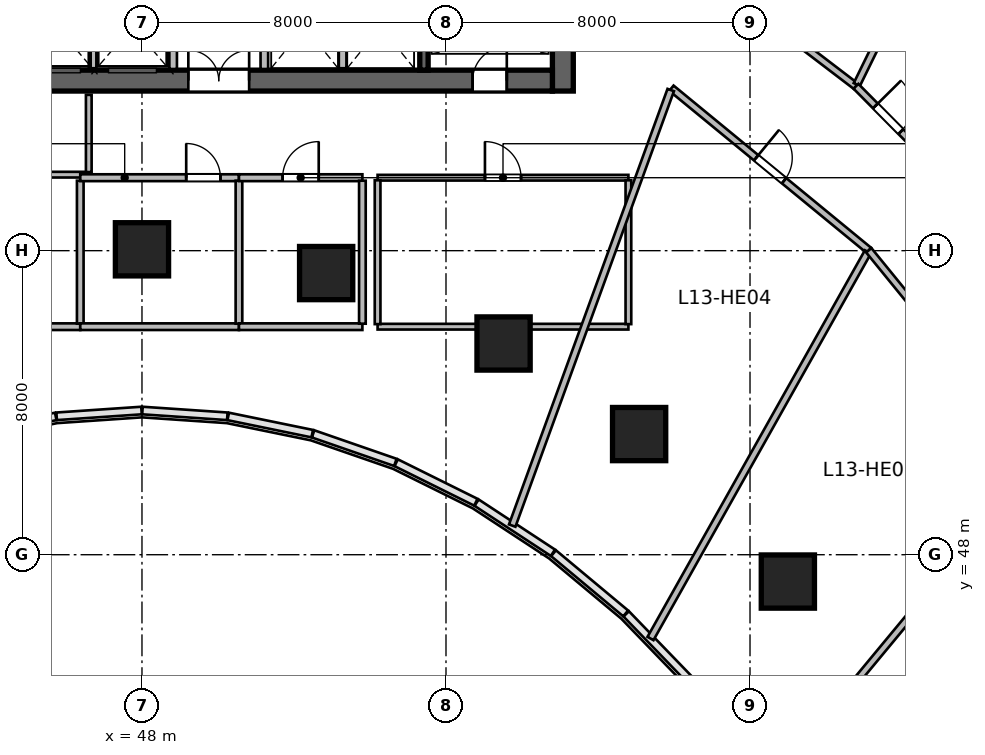
"""IFC4 building model, lengths in metres.
Left out: names, types, materials, properties, quantities, classifications, styles, units other than length and angle.
Written with IfcOpenShell. Run it as: python <this file> out.ifc"""

import sys

from ifc_helpers import new_model, si_unit, direction, frame, frame_2d, origin, origin_2d, place, context, subcontext, project, spatial, rectangle, circle, extrude, source, transform, mapped, element, fill, save


model = new_model("IFC4")
c1 = context("Model", 3, precision=1e-05, world=origin(), true_north=direction((0.0, 1.0)))
c2 = subcontext(c1, "Body", "Model", "MODEL_VIEW")
j1 = project(units=[si_unit("LENGTHUNIT", "METRE"), si_unit("PLANEANGLEUNIT", "RADIAN")], contexts=[c1])
p1 = place(None, origin())
s1 = spatial("IfcSite", under=j1, at=p1, CompositionType="ELEMENT")
p2 = place(p1, origin())
s2 = spatial("IfcBuilding", under=s1, at=p2, CompositionType="ELEMENT")
p3 = place(p2, frame((0.0, 0.0, 60.6)))
s3 = spatial("IfcBuildingStorey", under=s2, at=p3, CompositionType="ELEMENT", Elevation=60.6)
m1 = source(origin(), c2, "Body", "SweptSolid", [
    extrude(rectangle(XDim=12.0, YDim=0.55, at=frame_2d((6.0, 0.0))), origin(), (0.0, 0.0, 1.0), 3.6),
])
p4 = place(p3, frame((59.075, 60.2, 0.0), z_axis=(0.0, 0.0, 1.0), x_axis=(0.0, 1.0, 0.0)))
e1 = element("IfcWall", 1, at=p4, inside=s3, PredefinedType="SHEAR", context=c2, shape_type="MappedRepresentation", body=[
    mapped(m1, transform((0.0, 0.0, 0.0), scale=1.0)),
])
m2 = source(origin(), c2, "Body", "SweptSolid", [
    extrude(rectangle(XDim=21.6, YDim=0.55, at=frame_2d((10.8, 0.0))), origin(), (0.0, 0.0, 1.0), 3.6),
])
p5 = place(p3, frame((37.2, 60.475, 0.0), z_axis=(0.0, 0.0, 1.0), x_axis=(1.0, 0.0, 0.0)))
e2 = element("IfcWall", 2, at=p5, inside=s3, PredefinedType="SHEAR", context=c2, shape_type="MappedRepresentation", body=[
    mapped(m2, transform((0.0, 0.0, 0.0), scale=1.0)),
])
p6 = place(p5, frame((1.1, 0.0, 0.0)))
e3 = element("IfcOpeningElement", 3, at=p6, cuts=e2, PredefinedType="OPENING", context=c2, shape_type="SweptSolid", body=[
    extrude(rectangle(XDim=1.15, YDim=2.15, at=frame_2d((0.575, 1.075))), frame((0.0, 0.285, 0.0), z_axis=(0.0, -1.0, 0.0), x_axis=(1.0, 0.0, 0.0)), (0.0, 0.0, 1.0), 0.57),
])
p7 = place(p5, frame((19.5, 0.0, 0.0)))
e4 = element("IfcOpeningElement", 4, at=p7, cuts=e2, PredefinedType="OPENING", context=c2, shape_type="SweptSolid", body=[
    extrude(rectangle(XDim=0.9, YDim=2.1, at=frame_2d((0.45, 1.05))), frame((0.0, 0.285, 0.0), z_axis=(0.0, -1.0, 0.0), x_axis=(1.0, 0.0, 0.0)), (0.0, 0.0, 1.0), 0.57),
])
p8 = place(p5, frame((12.02, 0.0, 0.0)))
e5 = element("IfcOpeningElement", 5, at=p8, cuts=e2, PredefinedType="OPENING", context=c2, shape_type="SweptSolid", body=[
    extrude(rectangle(XDim=1.6, YDim=2.15, at=frame_2d((0.8, 1.075))), frame((0.0, 0.285, 0.0), z_axis=(0.0, -1.0, 0.0), x_axis=(1.0, 0.0, 0.0)), (0.0, 0.0, 1.0), 0.57),
])
m3 = source(origin(), c2, "Body", "SweptSolid", [
    extrude(rectangle(XDim=10.9, YDim=0.22, at=frame_2d((5.45, 0.0))), origin(), (0.0, 0.0, 1.0), 3.6),
])
p9 = place(p3, frame((55.42, 60.75, 0.0), z_axis=(0.0, 0.0, 1.0), x_axis=(0.0, 1.0, 0.0)))
e6 = element("IfcWall", 6, at=p9, inside=s3, PredefinedType="SHEAR", context=c2, shape_type="MappedRepresentation", body=[
    mapped(m3, transform((0.0, 0.0, 0.0), scale=1.0)),
])
p10 = place(p9, frame((9.495, 0.0, 0.0)))
e7 = element("IfcOpeningElement", 7, at=p10, cuts=e6, PredefinedType="OPENING", context=c2, shape_type="SweptSolid", body=[
    extrude(rectangle(XDim=1.15, YDim=2.15, at=frame_2d((0.575, 1.075))), frame((0.0, 0.12, 0.0), z_axis=(0.0, -1.0, 0.0), x_axis=(1.0, 0.0, 0.0)), (0.0, 0.0, 1.0), 0.24),
])
m4 = source(origin(), c2, "Body", "SweptSolid", [
    extrude(circle(Radius=0.7, at=origin_2d()), origin(), (0.0, 0.0, 1.0), 3.6),
])
for number, where, z_axis, x_axis in (
    (8, (48.0, 56.036, 0.0), (0.0, 0.0, 1.0), (0.0, 1.0, 0.0)),
    (9, (52.846, 55.411, 0.0), (0.0, 0.0, 1.0), (0.143, 0.99, 0.0)),
    (10, (57.515, 53.558, 0.0), (0.0, 0.0, 1.0), (0.289, 0.957, 0.0)),
    (11, (61.082, 51.175, 0.0), (0.0, 0.0, 1.0), (0.409, 0.912, 0.0)),
    (12, (64.996, 47.294, 0.0), (0.0, 0.0, 1.0), (0.558, 0.83, 0.0)),
):
    element("IfcColumn", number, at=place(p3, frame(where, z_axis=z_axis, x_axis=x_axis)), inside=s3, PredefinedType="COLUMN", context=c2, shape_type="MappedRepresentation", body=[
        mapped(m4, transform((0.0, 0.0, 0.0), scale=1.0)),
    ])
m5 = source(origin(), c2, "Body", "SweptSolid", [
    extrude(rectangle(XDim=2.24, YDim=0.2, at=frame_2d((1.12, 0.0))), origin(), (0.0, 0.0, 1.0), 3.36),
])
for number, where, z_axis, x_axis in (
    (13, (48.82, 60.78, 0.0), (0.0, 0.0, 1.0), (0.0, 1.0, 0.0)),
    (14, (51.22, 60.78, 0.0), (0.0, 0.0, 1.0), (0.0, 1.0, 0.0)),
):
    element("IfcWall", number, at=place(p3, frame(where, z_axis=z_axis, x_axis=x_axis)), inside=s3, PredefinedType="SOLIDWALL", context=c2, shape_type="MappedRepresentation", body=[
        mapped(m5, transform((0.0, 0.0, 0.0), scale=1.0)),
    ])
m6 = source(origin(), c2, "Body", "SweptSolid", [
    extrude(rectangle(XDim=2.2, YDim=0.2, at=frame_2d((1.1, 0.0))), origin(), (0.0, 0.0, 1.0), 3.36),
])
for number, where, z_axis, x_axis in (
    (15, (46.7, 60.8, 0.0), (0.0, 0.0, 1.0), (0.0, 1.0, 0.0)),
    (16, (53.28, 60.8, 0.0), (0.0, 0.0, 1.0), (0.0, 1.0, 0.0)),
):
    element("IfcWall", number, at=place(p3, frame(where, z_axis=z_axis, x_axis=x_axis)), inside=s3, PredefinedType="SOLIDWALL", context=c2, shape_type="MappedRepresentation", body=[
        mapped(m6, transform((0.0, 0.0, 0.0), scale=1.0)),
    ])
m7 = source(origin(), c2, "Body", "SweptSolid", [
    extrude(rectangle(XDim=5.4, YDim=0.15, at=frame_2d((2.7, 0.0))), origin(), (0.0, 0.0, 1.0), 3.36),
])
p11 = place(p3, frame((41.2, 58.0, 0.0), z_axis=(0.0, 0.0, 1.0), x_axis=(1.0, 0.0, 0.0)))
e17 = element("IfcWall", 17, at=p11, inside=s3, PredefinedType="PARTITIONING", context=c2, shape_type="MappedRepresentation", body=[
    mapped(m7, transform((0.0, 0.0, 0.0), scale=1.0)),
])
p12 = place(p11, frame((2.25, 0.0, 0.0)))
e18 = element("IfcOpeningElement", 18, at=p12, cuts=e17, PredefinedType="OPENING", context=c2, shape_type="SweptSolid", body=[
    extrude(rectangle(XDim=0.9, YDim=2.08, at=frame_2d((0.45, 1.04))), frame((0.0, 0.085, 0.0), z_axis=(0.0, -1.0, 0.0), x_axis=(1.0, 0.0, 0.0)), (0.0, 0.0, 1.0), 0.17),
])
m8 = source(origin(), c2, "Body", "SweptSolid", [
    extrude(rectangle(XDim=2.033, YDim=0.15, at=frame_2d((1.016, 0.0))), origin(), (0.0, 0.0, 1.0), 3.36),
])
p13 = place(p3, frame((46.6, 58.067, 0.0), z_axis=(0.0, 0.0, 1.0), x_axis=(0.0, 1.0, 0.0)))
e19 = element("IfcWall", 19, at=p13, inside=s3, PredefinedType="PARTITIONING", context=c2, shape_type="MappedRepresentation", body=[
    mapped(m8, transform((0.0, 0.0, 0.0), scale=1.0)),
])
m9 = source(origin(), c2, "Body", "SweptSolid", [
    extrude(rectangle(XDim=4.176, YDim=0.175, at=frame_2d((2.088, 0.0))), origin(), (0.0, 0.0, 1.0), 3.36),
])
p14 = place(p3, frame((42.2, 54.0, 0.0), z_axis=(0.0, 0.0, 1.0), x_axis=(1.0, 0.0, 0.0)))
e20 = element("IfcWall", 20, at=p14, inside=s3, PredefinedType="PARTITIONING", context=c2, shape_type="MappedRepresentation", body=[
    mapped(m9, transform((0.0, 0.0, 0.0), scale=1.0)),
])
m10 = source(origin(), c2, "Body", "SweptSolid", [
    extrude(rectangle(XDim=3.763, YDim=0.175, at=frame_2d((1.881, 0.0))), origin(), (0.0, 0.0, 1.0), 3.36),
])
p15 = place(p3, frame((46.376, 54.079, 0.0), z_axis=(0.0, 0.0, 1.0), x_axis=(0.0, 1.0, 0.0)))
e21 = element("IfcWall", 21, at=p15, inside=s3, PredefinedType="PARTITIONING", context=c2, shape_type="MappedRepresentation", body=[
    mapped(m10, transform((0.0, 0.0, 0.0), scale=1.0)),
])
p16 = place(p3, frame((46.376, 54.0, 0.0), z_axis=(0.0, 0.0, 1.0), x_axis=(1.0, 0.0, 0.0)))
e22 = element("IfcWall", 22, at=p16, inside=s3, PredefinedType="PARTITIONING", context=c2, shape_type="MappedRepresentation", body=[
    mapped(m9, transform((0.0, 0.0, 0.0), scale=1.0)),
])
m11 = source(origin(), c2, "Body", "SweptSolid", [
    extrude(rectangle(XDim=4.176, YDim=0.18, at=frame_2d((2.088, 0.0))), origin(), (0.0, 0.0, 1.0), 3.36),
])
p17 = place(p3, frame((46.376, 57.92, 0.0), z_axis=(0.0, 0.0, 1.0), x_axis=(1.0, 0.0, 0.0)))
e23 = element("IfcWall", 23, at=p17, inside=s3, PredefinedType="PLUMBINGWALL", context=c2, shape_type="MappedRepresentation", body=[
    mapped(m11, transform((0.0, 0.0, 0.0), scale=1.0)),
])
p18 = place(p17, frame((2.788, 0.0, 0.0)))
e24 = element("IfcOpeningElement", 24, at=p18, cuts=e23, PredefinedType="OPENING", context=c2, shape_type="SweptSolid", body=[
    extrude(rectangle(XDim=0.9, YDim=2.08, at=frame_2d((0.45, 1.04))), frame((0.0, 0.1, 0.0), z_axis=(0.0, -1.0, 0.0), x_axis=(1.0, 0.0, 0.0)), (0.0, 0.0, 1.0), 0.2),
])
p19 = place(p3, frame((50.552, 54.079, 0.0), z_axis=(0.0, 0.0, 1.0), x_axis=(0.0, 1.0, 0.0)))
e25 = element("IfcWall", 25, at=p19, inside=s3, PredefinedType="PARTITIONING", context=c2, shape_type="MappedRepresentation", body=[
    mapped(m10, transform((0.0, 0.0, 0.0), scale=1.0)),
])
m12 = source(origin(), c2, "Body", "SweptSolid", [
    extrude(rectangle(XDim=3.248, YDim=0.175, at=frame_2d((1.624, 0.0))), origin(), (0.0, 0.0, 1.0), 3.36),
])
p20 = place(p3, frame((50.552, 54.0, 0.0), z_axis=(0.0, 0.0, 1.0), x_axis=(1.0, 0.0, 0.0)))
e26 = element("IfcWall", 26, at=p20, inside=s3, PredefinedType="PARTITIONING", context=c2, shape_type="MappedRepresentation", body=[
    mapped(m12, transform((0.0, 0.0, 0.0), scale=1.0)),
])
m13 = source(origin(), c2, "Body", "SweptSolid", [
    extrude(rectangle(XDim=3.248, YDim=0.18, at=frame_2d((1.624, 0.0))), origin(), (0.0, 0.0, 1.0), 3.36),
])
p21 = place(p3, frame((50.552, 57.92, 0.0), z_axis=(0.0, 0.0, 1.0), x_axis=(1.0, 0.0, 0.0)))
e27 = element("IfcWall", 27, at=p21, inside=s3, PredefinedType="PLUMBINGWALL", context=c2, shape_type="MappedRepresentation", body=[
    mapped(m13, transform((0.0, 0.0, 0.0), scale=1.0)),
])
p22 = place(p21, frame((1.149, 0.0, 0.0)))
e28 = element("IfcOpeningElement", 28, at=p22, cuts=e27, PredefinedType="OPENING", context=c2, shape_type="SweptSolid", body=[
    extrude(rectangle(XDim=0.95, YDim=2.12, at=frame_2d((0.475, 1.06))), frame((0.0, 0.1, 0.0), z_axis=(0.0, -1.0, 0.0), x_axis=(1.0, 0.0, 0.0)), (0.0, 0.0, 1.0), 0.2),
])
p23 = place(p3, frame((53.8, 54.079, 0.0), z_axis=(0.0, 0.0, 1.0), x_axis=(0.0, 1.0, 0.0)))
e29 = element("IfcWall", 29, at=p23, inside=s3, PredefinedType="PARTITIONING", context=c2, shape_type="MappedRepresentation", body=[
    mapped(m10, transform((0.0, 0.0, 0.0), scale=1.0)),
])
m14 = source(origin(), c2, "Body", "SweptSolid", [
    extrude(rectangle(XDim=6.6, YDim=0.15, at=frame_2d((3.3, 0.0))), origin(), (0.0, 0.0, 1.0), 2.803),
])
p24 = place(p3, frame((54.2, 54.0, 0.0), z_axis=(0.0, 0.0, 1.0), x_axis=(1.0, 0.0, 0.0)))
e30 = element("IfcWall", 30, at=p24, inside=s3, PredefinedType="PARTITIONING", context=c2, shape_type="MappedRepresentation", body=[
    mapped(m14, transform((0.0, 0.0, 0.0), scale=1.0)),
])
m15 = source(origin(), c2, "Body", "SweptSolid", [
    extrude(rectangle(XDim=6.6, YDim=0.15, at=frame_2d((3.3, 0.0))), origin(), (0.0, 0.0, 1.0), 3.36),
])
p25 = place(p3, frame((54.2, 57.92, 0.0), z_axis=(0.0, 0.0, 1.0), x_axis=(1.0, 0.0, 0.0)))
e31 = element("IfcWall", 31, at=p25, inside=s3, PredefinedType="PARTITIONING", context=c2, shape_type="MappedRepresentation", body=[
    mapped(m15, transform((0.0, 0.0, 0.0), scale=1.0)),
])
p26 = place(p25, frame((2.825, 0.0, 0.0)))
e32 = element("IfcOpeningElement", 32, at=p26, cuts=e31, PredefinedType="OPENING", context=c2, shape_type="SweptSolid", body=[
    extrude(rectangle(XDim=0.95, YDim=2.1, at=frame_2d((0.475, 1.05))), frame((0.0, 0.085, 0.0), z_axis=(0.0, -1.0, 0.0), x_axis=(1.0, 0.0, 0.0)), (0.0, 0.0, 1.0), 0.17),
])
m16 = source(origin(), c2, "Body", "SweptSolid", [
    extrude(rectangle(XDim=3.785, YDim=0.15, at=frame_2d((1.893, 0.0))), origin(), (0.0, 0.0, 1.0), 3.36),
])
for number, where, z_axis, x_axis in (
    (33, (54.2, 54.067, 0.0), (0.0, 0.0, 1.0), (0.0, 1.0, 0.0)),
    (34, (60.8, 54.067, 0.0), (0.0, 0.0, 1.0), (0.0, 1.0, 0.0)),
):
    element("IfcWall", number, at=place(p3, frame(where, z_axis=z_axis, x_axis=x_axis)), inside=s3, PredefinedType="PARTITIONING", context=c2, shape_type="MappedRepresentation", body=[
        mapped(m16, transform((0.0, 0.0, 0.0), scale=1.0)),
    ])
m17 = source(origin(), c2, "Body", "SweptSolid", [
    extrude(rectangle(XDim=4.762, YDim=0.18, at=frame_2d((2.381, 0.0))), origin(), (0.0, 0.0, 1.0), 3.36),
])
p27 = place(p3, frame((63.001, 63.214, 0.0), z_axis=(0.0, 0.0, 1.0), x_axis=(0.795070295872, -0.60651729128, 0.0)))
e35 = element("IfcWall", 35, at=p27, inside=s3, PredefinedType="PLUMBINGWALL", context=c2, shape_type="MappedRepresentation", body=[
    mapped(m17, transform((0.0, 0.0, 0.0), scale=1.0)),
])
p28 = place(p27, frame((0.668, 0.0, 0.0)))
e36 = element("IfcOpeningElement", 36, at=p28, cuts=e35, PredefinedType="OPENING", context=c2, shape_type="SweptSolid", body=[
    extrude(rectangle(XDim=0.95, YDim=2.15, at=frame_2d((0.475, 1.075))), frame((0.0, 0.1, 0.0), z_axis=(0.0, -1.0, 0.0), x_axis=(1.0, 0.0, 0.0)), (0.0, 0.0, 1.0), 0.2),
])
m18 = source(origin(), c2, "Body", "SweptSolid", [
    extrude(rectangle(XDim=11.775, YDim=0.18, at=frame_2d((5.887, 0.0))), origin(), (0.0, 0.0, 1.0), 3.36),
])
p29 = place(p3, frame((66.81, 60.371, 0.0), z_axis=(0.0, 0.0, 1.0), x_axis=(0.4401500056, 0.897924257702, 0.0)))
e37 = element("IfcWall", 37, at=p29, inside=s3, PredefinedType="PLUMBINGWALL", context=c2, shape_type="MappedRepresentation", body=[
    mapped(m18, transform((0.0, 0.0, 0.0), scale=1.0)),
])
m19 = source(origin(), c2, "Body", "SweptSolid", [
    extrude(rectangle(XDim=5.012, YDim=0.18, at=frame_2d((2.506, 0.0))), origin(), (0.0, 0.0, 1.0), 3.36),
])
p30 = place(p3, frame((66.788, 60.326, 0.0), z_axis=(0.0, 0.0, 1.0), x_axis=(0.703664626435, -0.710532260707, 0.0)))
e38 = element("IfcWall", 38, at=p30, inside=s3, PredefinedType="PLUMBINGWALL", context=c2, shape_type="MappedRepresentation", body=[
    mapped(m19, transform((0.0, 0.0, 0.0), scale=1.0)),
])
p31 = place(p30, frame((0.728, 0.0, 0.0)))
e39 = element("IfcOpeningElement", 39, at=p31, cuts=e38, PredefinedType="OPENING", context=c2, shape_type="SweptSolid", body=[
    extrude(rectangle(XDim=0.95, YDim=2.15, at=frame_2d((0.475, 1.075))), frame((0.0, 0.1, 0.0), z_axis=(0.0, -1.0, 0.0), x_axis=(1.0, 0.0, 0.0)), (0.0, 0.0, 1.0), 0.2),
])
m20 = source(origin(), c2, "Body", "SweptSolid", [
    extrude(rectangle(XDim=6.721, YDim=0.18, at=frame_2d((3.361, 0.0))), origin(), (0.0, 0.0, 1.0), 3.36),
])
p32 = place(p3, frame((61.931, 60.275, 0.0), z_axis=(0.0, 0.0, 1.0), x_axis=(0.772828051199, -0.63461547671, 0.0)))
e40 = element("IfcWall", 40, at=p32, inside=s3, PredefinedType="PLUMBINGWALL", context=c2, shape_type="MappedRepresentation", body=[
    mapped(m20, transform((0.0, 0.0, 0.0), scale=1.0)),
])
p33 = place(p32, frame((2.885, 0.0, 0.0)))
e41 = element("IfcOpeningElement", 41, at=p33, cuts=e40, PredefinedType="OPENING", context=c2, shape_type="SweptSolid", body=[
    extrude(rectangle(XDim=0.95, YDim=2.15, at=frame_2d((0.475, 1.075))), frame((0.0, 0.1, 0.0), z_axis=(0.0, -1.0, 0.0), x_axis=(1.0, 0.0, 0.0)), (0.0, 0.0, 1.0), 0.2),
])
m21 = source(origin(), c2, "Body", "SweptSolid", [
    extrude(rectangle(XDim=12.196, YDim=0.18, at=frame_2d((6.098, 0.0))), origin(), (0.0, 0.0, 1.0), 3.36),
])
p34 = place(p3, frame((57.742, 48.766, 0.0), z_axis=(0.0, 0.0, 1.0), x_axis=(0.342022711534, 0.939691686031, 0.0)))
e42 = element("IfcWall", 42, at=p34, inside=s3, PredefinedType="PLUMBINGWALL", context=c2, shape_type="MappedRepresentation", body=[
    mapped(m21, transform((0.0, 0.0, 0.0), scale=1.0)),
])
m22 = source(origin(), c2, "Body", "SweptSolid", [
    extrude(rectangle(XDim=11.67, YDim=0.18, at=frame_2d((5.835, 0.0))), origin(), (0.0, 0.0, 1.0), 3.36),
])
p35 = place(p3, frame((61.381, 45.795, 0.0), z_axis=(0.0, 0.0, 1.0), x_axis=(0.490156946222, 0.871634193954, 0.0)))
e43 = element("IfcWall", 43, at=p35, inside=s3, PredefinedType="PLUMBINGWALL", context=c2, shape_type="MappedRepresentation", body=[
    mapped(m22, transform((0.0, 0.0, 0.0), scale=1.0)),
])
m23 = source(origin(), c2, "Body", "SweptSolid", [
    extrude(rectangle(XDim=7.113, YDim=0.18, at=frame_2d((3.556, 0.0))), origin(), (0.0, 0.0, 1.0), 3.36),
])
p36 = place(p3, frame((67.126, 56.01, 0.0), z_axis=(0.0, 0.0, 1.0), x_axis=(0.63149032532, -0.775383755974, 0.0)))
e44 = element("IfcWall", 44, at=p36, inside=s3, PredefinedType="PLUMBINGWALL", context=c2, shape_type="MappedRepresentation", body=[
    mapped(m23, transform((0.0, 0.0, 0.0), scale=1.0)),
])
p37 = place(p36, frame((3.081, 0.0, 0.0)))
e45 = element("IfcOpeningElement", 45, at=p37, cuts=e44, PredefinedType="OPENING", context=c2, shape_type="SweptSolid", body=[
    extrude(rectangle(XDim=0.95, YDim=2.15, at=frame_2d((0.475, 1.075))), frame((0.0, 0.1, 0.0), z_axis=(0.0, -1.0, 0.0), x_axis=(1.0, 0.0, 0.0)), (0.0, 0.0, 1.0), 0.2),
])
m24 = source(origin(), c2, "Body", "SweptSolid", [
    extrude(rectangle(XDim=11.053, YDim=0.18, at=frame_2d((5.527, 0.0))), origin(), (0.0, 0.0, 1.0), 3.36),
])
p38 = place(p3, frame((64.534, 41.949, 0.0), z_axis=(0.0, 0.0, 1.0), x_axis=(0.638131235571, 0.769927611005, 0.0)))
e46 = element("IfcWall", 46, at=p38, inside=s3, PredefinedType="PLUMBINGWALL", context=c2, shape_type="MappedRepresentation", body=[
    mapped(m24, transform((0.0, 0.0, 0.0), scale=1.0)),
])
m25 = source(origin(), c2, "Body", "SweptSolid", [
    extrude(rectangle(XDim=0.9, YDim=2.1, at=frame_2d((0.45, 1.05))), frame((0.0, 0.025, 0.0), z_axis=(0.0, -1.0, 0.0), x_axis=(1.0, 0.0, 0.0)), (0.0, 0.0, 1.0), 0.05),
])
p39 = place(p7, origin())
e47 = element("IfcDoor", 47, at=p39, inside=s3, OperationType="SINGLE_SWING_RIGHT", PredefinedType="DOOR", context=c2, shape_type="MappedRepresentation", body=[
    mapped(m25, transform((0.0, 0.0, 0.0), scale=1.0)),
])
fill(e4, e47)
m26 = source(origin(), c2, "Body", "SweptSolid", [
    extrude(rectangle(XDim=1.6, YDim=2.15, at=frame_2d((0.8, 1.075))), frame((0.0, 0.025, 0.0), z_axis=(0.0, -1.0, 0.0), x_axis=(1.0, 0.0, 0.0)), (0.0, 0.0, 1.0), 0.05),
])
p40 = place(p8, origin())
e48 = element("IfcDoor", 48, at=p40, inside=s3, OperationType="DOUBLE_DOOR_SINGLE_SWING", PredefinedType="DOOR", context=c2, shape_type="MappedRepresentation", body=[
    mapped(m26, transform((0.0, 0.0, 0.0), scale=1.0)),
])
fill(e5, e48)
m27 = source(origin(), c2, "Body", "SweptSolid", [
    extrude(rectangle(XDim=0.9, YDim=2.08, at=frame_2d((0.45, 1.04))), frame((0.0, 0.025, 0.0), z_axis=(0.0, -1.0, 0.0), x_axis=(1.0, 0.0, 0.0)), (0.0, 0.0, 1.0), 0.05),
])
p41 = place(p18, origin())
e49 = element("IfcDoor", 49, at=p41, inside=s3, OperationType="SINGLE_SWING_LEFT", PredefinedType="DOOR", context=c2, shape_type="MappedRepresentation", body=[
    mapped(m27, transform((0.0, 0.0, 0.0), scale=1.0)),
])
fill(e24, e49)
m28 = source(origin(), c2, "Body", "SweptSolid", [
    extrude(rectangle(XDim=0.95, YDim=2.12, at=frame_2d((0.475, 1.06))), frame((0.0, 0.025, 0.0), z_axis=(0.0, -1.0, 0.0), x_axis=(1.0, 0.0, 0.0)), (0.0, 0.0, 1.0), 0.05),
])
p42 = place(p22, origin())
e50 = element("IfcDoor", 50, at=p42, inside=s3, OperationType="SINGLE_SWING_RIGHT", PredefinedType="DOOR", context=c2, shape_type="MappedRepresentation", body=[
    mapped(m28, transform((0.0, 0.0, 0.0), scale=1.0)),
])
fill(e28, e50)
m29 = source(origin(), c2, "Body", "SweptSolid", [
    extrude(rectangle(XDim=0.95, YDim=2.1, at=frame_2d((0.475, 1.05))), frame((0.0, 0.025, 0.0), z_axis=(0.0, -1.0, 0.0), x_axis=(1.0, 0.0, 0.0)), (0.0, 0.0, 1.0), 0.05),
])
p43 = place(p26, origin())
e51 = element("IfcDoor", 51, at=p43, inside=s3, OperationType="SINGLE_SWING_LEFT", PredefinedType="DOOR", context=c2, shape_type="MappedRepresentation", body=[
    mapped(m29, transform((0.0, 0.0, 0.0), scale=1.0)),
])
fill(e32, e51)
m30 = source(origin(), c2, "Body", "SweptSolid", [
    extrude(rectangle(XDim=0.95, YDim=2.15, at=frame_2d((0.475, 1.075))), frame((0.0, 0.025, 0.0), z_axis=(0.0, -1.0, 0.0), x_axis=(1.0, 0.0, 0.0)), (0.0, 0.0, 1.0), 0.05),
])
p44 = place(p31, origin())
e52 = element("IfcDoor", 52, at=p44, inside=s3, OperationType="SINGLE_SWING_LEFT", PredefinedType="DOOR", context=c2, shape_type="MappedRepresentation", body=[
    mapped(m30, transform((0.0, 0.0, 0.0), scale=1.0)),
])
fill(e39, e52)
p45 = place(p33, origin())
e53 = element("IfcDoor", 53, at=p45, inside=s3, OperationType="SINGLE_SWING_LEFT", PredefinedType="DOOR", context=c2, shape_type="MappedRepresentation", body=[
    mapped(m30, transform((0.0, 0.0, 0.0), scale=1.0)),
])
fill(e41, e53)
save(model, sys.argv[1])
